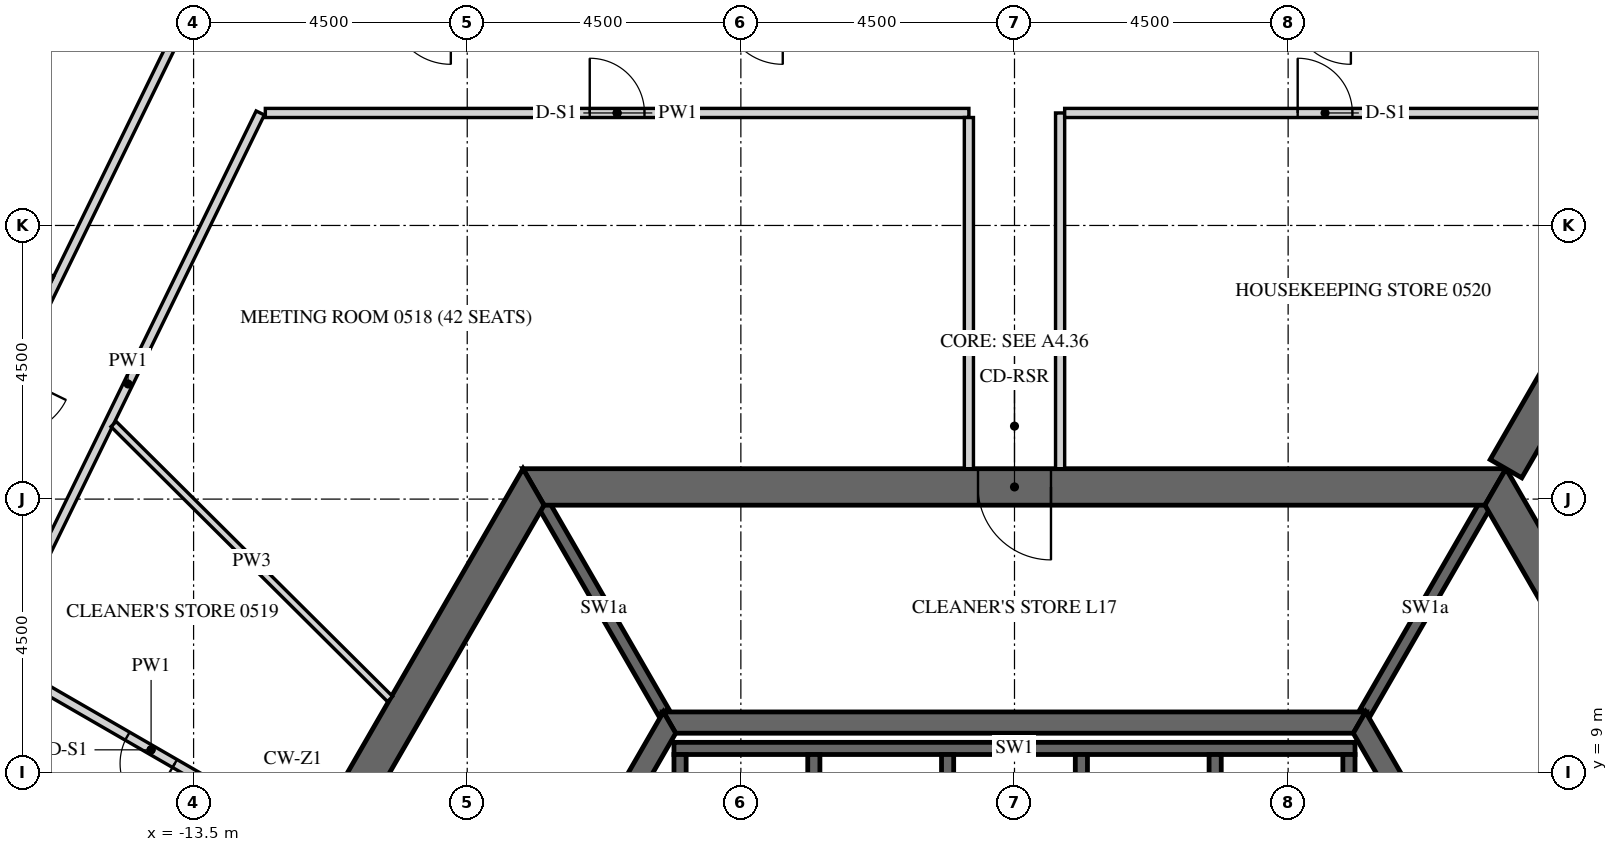
"""IFC4 building model, lengths in metres.
Left out: names, types, materials, properties, quantities, classifications, styles, units other than length and angle.
Written with IfcOpenShell. Run it as: python <this file> out.ifc"""

import sys

from ifc_helpers import new_model, si_unit, direction, frame, frame_2d, origin, place, context, subcontext, project, spatial, polyline, rectangle, outline, extrude, element, fill, save


model = new_model("IFC4")
c1 = context("Model", 3, precision=1e-05, world=origin(), true_north=direction((0.0, 1.0)))
c2 = subcontext(c1, "Body", "Model", "MODEL_VIEW")
j1 = project(units=[si_unit("LENGTHUNIT", "METRE"), si_unit("PLANEANGLEUNIT", "RADIAN")], contexts=[c1])
p1 = place(None, origin())
s1 = spatial("IfcSite", under=j1, at=p1, CompositionType="ELEMENT")
p2 = place(p1, origin())
s2 = spatial("IfcBuilding", under=s1, at=p2, CompositionType="ELEMENT")
p3 = place(p2, frame((0.0, 0.0, 80.4)))
s3 = spatial("IfcBuildingStorey", under=s2, at=p3, CompositionType="ELEMENT", Elevation=80.4)
p4 = place(p3, frame((-7.91, 13.7, -0.15), z_axis=(0.0, 0.0, 1.0), x_axis=(-0.499999880136, -0.866025472988, 0.0)))
e1 = element("IfcWall", 1, at=p4, inside=s3, PredefinedType="SHEAR", context=c2, shape_type="SweptSolid", body=[
    extrude(outline(polyline([(-0.173, -0.3), (15.993, -0.3), (15.646, 0.3), (0.173, 0.3), (-0.173, -0.3)])), origin(), (0.0, 0.0, 1.0), 3.9),
])
p5 = place(p4, frame((7.039, 0.0, 0.15)))
e2 = element("IfcOpeningElement", 2, at=p5, cuts=e1, PredefinedType="OPENING", context=c2, shape_type="SweptSolid", body=[
    extrude(rectangle(XDim=1.8, YDim=2.4, at=frame_2d((0.9, 1.2))), frame((0.0, 0.31, 0.0), z_axis=(0.0, -1.0, 0.0), x_axis=(1.0, 0.0, 0.0)), (0.0, 0.0, 1.0), 0.62),
])
p6 = place(p3, frame((15.819, 0.0, -0.15), z_axis=(0.0, 0.0, 1.0), x_axis=(-0.499999880136, 0.866025472988, 0.0)))
e3 = element("IfcWall", 3, at=p6, inside=s3, PredefinedType="SHEAR", context=c2, shape_type="SweptSolid", body=[
    extrude(outline(polyline([(-0.173, -0.3), (15.993, -0.3), (15.646, 0.3), (0.173, 0.3), (-0.173, -0.3)])), origin(), (0.0, 0.0, 1.0), 3.9),
])
p7 = place(p6, frame((6.981, 0.0, 0.15)))
e4 = element("IfcOpeningElement", 4, at=p7, cuts=e3, PredefinedType="OPENING", context=c2, shape_type="SweptSolid", body=[
    extrude(rectangle(XDim=1.8, YDim=2.4, at=frame_2d((0.9, 1.2))), frame((0.0, 0.31, 0.0), z_axis=(0.0, -1.0, 0.0), x_axis=(1.0, 0.0, 0.0)), (0.0, 0.0, 1.0), 0.62),
])
p8 = place(p3, frame((7.91, 13.7, -0.15), z_axis=(0.0, 0.0, 1.0), x_axis=(-1.0, 0.0, 0.0)))
e5 = element("IfcWall", 5, at=p8, inside=s3, PredefinedType="SHEAR", context=c2, shape_type="SweptSolid", body=[
    extrude(outline(polyline([(-0.173, -0.3), (15.993, -0.3), (15.646, 0.3), (0.173, 0.3), (-0.173, -0.3)])), origin(), (0.0, 0.0, 1.0), 3.9),
])
p9 = place(p8, frame((7.31, 0.0, 0.15)))
e6 = element("IfcOpeningElement", 6, at=p9, cuts=e5, PredefinedType="OPENING", context=c2, shape_type="SweptSolid", body=[
    extrude(rectangle(XDim=1.2, YDim=2.4, at=frame_2d((0.6, 1.2))), frame((0.0, 0.31, 0.0), z_axis=(0.0, -1.0, 0.0), x_axis=(1.0, 0.0, 0.0)), (0.0, 0.0, 1.0), 0.62),
])
p10 = place(p3, frame((8.083, 14.0, -0.15), z_axis=(0.0, 0.0, 1.0), x_axis=(0.499997680643, 0.866026742862, 0.0)))
e7 = element("IfcWall", 7, at=p10, inside=s3, PredefinedType="SHEAR", context=c2, shape_type="SweptSolid", body=[
    extrude(rectangle(XDim=16.509, YDim=0.6, at=frame_2d((8.254, 0.0))), origin(), (0.0, 0.0, 1.0), 3.9),
])
p11 = place(p10, frame((7.354, 0.0, 0.15)))
e8 = element("IfcOpeningElement", 8, at=p11, cuts=e7, PredefinedType="OPENING", context=c2, shape_type="SweptSolid", body=[
    extrude(rectangle(XDim=1.8, YDim=2.4, at=frame_2d((0.9, 1.2))), frame((0.0, 0.31, 0.0), z_axis=(0.0, -1.0, 0.0), x_axis=(1.0, 0.0, 0.0)), (0.0, 0.0, 1.0), 0.62),
])
p12 = place(p3, frame((-5.673, 9.825, -0.15), z_axis=(0.0, 0.0, 1.0), x_axis=(-0.499995046907, -0.866028263435, 0.0)))
e9 = element("IfcWall", 9, at=p12, inside=s3, PredefinedType="SHEAR", context=c2, shape_type="SweptSolid", body=[
    extrude(outline(polyline([(-0.101, -0.175), (11.446, -0.175), (11.244, 0.175), (0.101, 0.175), (-0.101, -0.175)])), origin(), (0.0, 0.0, 1.0), 3.9),
])
p13 = place(p12, frame((4.801, 0.0, 0.15)))
e10 = element("IfcOpeningElement", 10, at=p13, cuts=e9, PredefinedType="OPENING", context=c2, shape_type="SweptSolid", body=[
    extrude(rectangle(XDim=1.8, YDim=2.4, at=frame_2d((0.9, 1.2))), frame((0.0, 0.185, 0.0), z_axis=(0.0, -1.0, 0.0), x_axis=(1.0, 0.0, 0.0)), (0.0, 0.0, 1.0), 0.37),
])
p14 = place(p3, frame((11.345, 0.0, -0.15), z_axis=(0.0, 0.0, 1.0), x_axis=(-0.499995046907, 0.866028263435, 0.0)))
e11 = element("IfcWall", 11, at=p14, inside=s3, PredefinedType="SHEAR", context=c2, shape_type="SweptSolid", body=[
    extrude(outline(polyline([(-0.101, -0.175), (11.446, -0.175), (11.244, 0.175), (0.101, 0.175), (-0.101, -0.175)])), origin(), (0.0, 0.0, 1.0), 3.9),
])
p15 = place(p14, frame((4.744, 0.0, 0.15)))
e12 = element("IfcOpeningElement", 12, at=p15, cuts=e11, PredefinedType="OPENING", context=c2, shape_type="SweptSolid", body=[
    extrude(rectangle(XDim=1.8, YDim=2.4, at=frame_2d((0.9, 1.2))), frame((0.0, 0.185, 0.0), z_axis=(0.0, -1.0, 0.0), x_axis=(1.0, 0.0, 0.0)), (0.0, 0.0, 1.0), 0.37),
])
p16 = place(p3, frame((5.673, 9.825, -0.15), z_axis=(0.0, 0.0, 1.0), x_axis=(-1.0, 0.0, 0.0)))
e13 = element("IfcWall", 13, at=p16, inside=s3, PredefinedType="SHEAR", context=c2, shape_type="SweptSolid", body=[
    extrude(outline(polyline([(-0.101, -0.175), (11.446, -0.175), (11.244, 0.175), (0.101, 0.175), (-0.101, -0.175)])), origin(), (0.0, 0.0, 1.0), 3.9),
])
p17 = place(p3, frame((-5.6, 9.4, -0.25), z_axis=(0.0, 0.0, 1.0), x_axis=(1.0, 0.0, 0.0)))
e14 = element("IfcWall", 14, at=p17, inside=s3, PredefinedType="SHEAR", context=c2, shape_type="SweptSolid", body=[
    extrude(rectangle(XDim=11.2, YDim=0.2, at=frame_2d((5.6, 0.0))), origin(), (0.0, 0.0, 1.0), 3.9),
])
for number, where, z_axis, x_axis in (
    (15, (-5.5, 6.4, -0.25), (0.0, 0.0, 1.0), (0.0, 1.0, 0.0)),
    (16, (-3.3, 6.4, -0.25), (0.0, 0.0, 1.0), (0.0, 1.0, 0.0)),
    (17, (-1.1, 6.4, -0.25), (0.0, 0.0, 1.0), (0.0, 1.0, 0.0)),
    (18, (1.1, 6.4, -0.25), (0.0, 0.0, 1.0), (0.0, 1.0, 0.0)),
    (19, (3.3, 6.4, -0.25), (0.0, 0.0, 1.0), (0.0, 1.0, 0.0)),
    (20, (5.5, 6.4, -0.25), (0.0, 0.0, 1.0), (0.0, 1.0, 0.0)),
):
    element("IfcWall", number, at=place(p3, frame(where, z_axis=z_axis, x_axis=x_axis)), inside=s3, PredefinedType="SHEAR", context=c2, shape_type="SweptSolid", body=[
        extrude(rectangle(XDim=2.9, YDim=0.2, at=frame_2d((1.45, 0.0))), origin(), (0.0, 0.0, 1.0), 3.9),
    ])
for number, where, z_axis, x_axis in (
    (21, (5.773, 10.0, -0.15), (0.0, 0.0, 1.0), (0.5, 0.866, 0.0)),
    (22, (-5.773, 10.0, -0.15), (0.0, 0.0, 1.0), (-0.5, 0.866, 0.0)),
):
    element("IfcWall", number, at=place(p3, frame(where, z_axis=z_axis, x_axis=x_axis)), inside=s3, PredefinedType="SHEAR", context=c2, shape_type="SweptSolid", body=[
        extrude(rectangle(XDim=3.926, YDim=0.2, at=frame_2d((1.963, 0.0))), origin(), (0.0, 0.0, 1.0), 3.9),
    ])
p18 = place(p3, frame((-13.565, 21.575, 0.0), z_axis=(0.0, 0.0, 1.0), x_axis=(-0.438380787243, -0.898789344272, 0.0)))
e23 = element("IfcWall", 23, at=p18, inside=s3, PredefinedType="PARTITIONING", context=c2, shape_type="SweptSolid", body=[
    extrude(rectangle(XDim=21.668, YDim=0.15, at=frame_2d((10.834, 0.0))), origin(), (0.0, 0.0, 1.0), 2.988),
])
p19 = place(p18, frame((6.684, 0.0, 0.0)))
e24 = element("IfcOpeningElement", 24, at=p19, cuts=e23, PredefinedType="OPENING", context=c2, shape_type="SweptSolid", body=[
    extrude(rectangle(XDim=1.0, YDim=2.1, at=frame_2d((0.5, 1.05))), frame((0.0, 0.085, 0.0), z_axis=(0.0, -1.0, 0.0), x_axis=(1.0, 0.0, 0.0)), (0.0, 0.0, 1.0), 0.17),
])
p20 = place(p18, frame((17.651, 0.0, 0.0)))
e25 = element("IfcOpeningElement", 25, at=p20, cuts=e23, PredefinedType="OPENING", context=c2, shape_type="SweptSolid", body=[
    extrude(rectangle(XDim=1.0, YDim=2.1, at=frame_2d((0.5, 1.05))), frame((0.0, 0.085, 0.0), z_axis=(0.0, -1.0, 0.0), x_axis=(1.0, 0.0, 0.0)), (0.0, 0.0, 1.0), 0.17),
])
p21 = place(p3, frame((-16.751, 10.937, 0.0), z_axis=(0.0, 0.0, 1.0), x_axis=(0.438378523504, 0.898790448397, 0.0)))
e26 = element("IfcWall", 26, at=p21, inside=s3, PredefinedType="PARTITIONING", context=c2, shape_type="SweptSolid", body=[
    extrude(rectangle(XDim=9.917, YDim=0.15, at=frame_2d((4.958, 0.0))), origin(), (0.0, 0.0, 1.0), 2.988),
])
p22 = place(p3, frame((-12.32, 19.85, 0.0), z_axis=(0.0, 0.0, 1.0), x_axis=(1.0, 0.0, 0.0)))
e27 = element("IfcWall", 27, at=p22, inside=s3, PredefinedType="PARTITIONING", context=c2, shape_type="SweptSolid", body=[
    extrude(rectangle(XDim=11.57, YDim=0.15, at=frame_2d((5.785, 0.0))), origin(), (0.0, 0.0, 1.0), 2.988),
])
p23 = place(p22, frame((5.335, 0.0, 0.0)))
e28 = element("IfcOpeningElement", 28, at=p23, cuts=e27, PredefinedType="OPENING", context=c2, shape_type="SweptSolid", body=[
    extrude(rectangle(XDim=0.9, YDim=2.1, at=frame_2d((0.45, 1.05))), frame((0.0, 0.085, 0.0), z_axis=(0.0, -1.0, 0.0), x_axis=(1.0, 0.0, 0.0)), (0.0, 0.0, 1.0), 0.17),
])
p24 = place(p3, frame((-0.75, 19.775, 0.0), z_axis=(0.0, 0.0, 1.0), x_axis=(0.0, -1.0, 0.0)))
e29 = element("IfcWall", 29, at=p24, inside=s3, PredefinedType="PARTITIONING", context=c2, shape_type="SweptSolid", body=[
    extrude(rectangle(XDim=5.775, YDim=0.15, at=frame_2d((2.887, 0.0))), origin(), (0.0, 0.0, 1.0), 2.988),
])
p25 = place(p3, frame((-11.614, 7.884, 0.0), z_axis=(0.0, 0.0, 1.0), x_axis=(-0.86603508376, 0.499983233416, 0.0)))
e30 = element("IfcWall", 30, at=p25, inside=s3, PredefinedType="PARTITIONING", context=c2, shape_type="SweptSolid", body=[
    extrude(rectangle(XDim=5.97, YDim=0.15, at=frame_2d((2.985, 0.0))), origin(), (0.0, 0.0, 1.0), 2.988),
])
p26 = place(p25, frame((2.535, 0.0, 0.0)))
e31 = element("IfcOpeningElement", 31, at=p26, cuts=e30, PredefinedType="OPENING", context=c2, shape_type="SweptSolid", body=[
    extrude(rectangle(XDim=0.9, YDim=2.1, at=frame_2d((0.45, 1.05))), frame((0.0, 0.085, 0.0), z_axis=(0.0, -1.0, 0.0), x_axis=(1.0, 0.0, 0.0)), (0.0, 0.0, 1.0), 0.17),
])
p27 = place(p3, frame((0.75, 14.0, 0.0), z_axis=(0.0, 0.0, 1.0), x_axis=(0.0, 1.0, 0.0)))
e32 = element("IfcWall", 32, at=p27, inside=s3, PredefinedType="PARTITIONING", context=c2, shape_type="SweptSolid", body=[
    extrude(rectangle(XDim=5.85, YDim=0.15, at=frame_2d((2.925, 0.0))), origin(), (0.0, 0.0, 1.0), 2.988),
])
p28 = place(p3, frame((0.825, 19.85, 0.0), z_axis=(0.0, 0.0, 1.0), x_axis=(1.0, 0.0, 0.0)))
e33 = element("IfcWall", 33, at=p28, inside=s3, PredefinedType="PARTITIONING", context=c2, shape_type="SweptSolid", body=[
    extrude(rectangle(XDim=8.564, YDim=0.15, at=frame_2d((4.282, 0.0))), origin(), (0.0, 0.0, 1.0), 2.988),
])
p29 = place(p28, frame((3.832, 0.0, 0.0)))
e34 = element("IfcOpeningElement", 34, at=p29, cuts=e33, PredefinedType="OPENING", context=c2, shape_type="SweptSolid", body=[
    extrude(rectangle(XDim=0.9, YDim=2.1, at=frame_2d((0.45, 1.05))), frame((0.0, 0.085, 0.0), z_axis=(0.0, -1.0, 0.0), x_axis=(1.0, 0.0, 0.0)), (0.0, 0.0, 1.0), 0.17),
])
p30 = place(p3, frame((-17.642, 8.94, 0.0), z_axis=(0.0, 0.0, 1.0), x_axis=(0.866017948234, -0.500012913169, 0.0)))
e35 = element("IfcWall", 35, at=p30, inside=s3, PredefinedType="PARTITIONING", context=c2, shape_type="SweptSolid", body=[
    extrude(rectangle(XDim=5.748, YDim=0.15, at=frame_2d((2.874, 0.0))), origin(), (0.0, 0.0, 1.0), 2.988),
])
p31 = place(p3, frame((-22.782, 20.47, 0.0), z_axis=(0.0, 0.0, 1.0), x_axis=(0.898789402655, -0.438380667542, 0.0)))
e36 = element("IfcWall", 36, at=p31, inside=s3, PredefinedType="PARTITIONING", context=c2, shape_type="SweptSolid", body=[
    extrude(rectangle(XDim=7.725, YDim=0.18, at=frame_2d((3.862, 0.0))), origin(), (0.0, 0.0, 1.0), 2.988),
])
p32 = place(p3, frame((-14.815, 14.734, 0.0), z_axis=(0.0, 0.0, 1.0), x_axis=(0.709046184876, -0.705162043584, 0.0)))
e37 = element("IfcWall", 37, at=p32, inside=s3, PredefinedType="PARTITIONING", context=c2, shape_type="SweptSolid", body=[
    extrude(rectangle(XDim=6.411, YDim=0.12, at=frame_2d((3.206, 0.0))), origin(), (0.0, 0.0, 1.0), 2.988),
])
p33 = place(p9, origin())
e38 = element("IfcDoor", 38, at=p33, inside=s3, OperationType="SINGLE_SWING_LEFT", PredefinedType="DOOR", context=c2, shape_type="SweptSolid", body=[
    extrude(rectangle(XDim=1.2, YDim=2.4, at=frame_2d((0.6, 1.2))), frame((0.0, 0.025, 0.0), z_axis=(0.0, -1.0, 0.0), x_axis=(1.0, 0.0, 0.0)), (0.0, 0.0, 1.0), 0.05),
])
fill(e6, e38)
p34 = place(p23, origin())
e39 = element("IfcDoor", 39, at=p34, inside=s3, OperationType="SINGLE_SWING_RIGHT", PredefinedType="DOOR", context=c2, shape_type="SweptSolid", body=[
    extrude(rectangle(XDim=0.9, YDim=2.1, at=frame_2d((0.45, 1.05))), frame((0.0, 0.025, 0.0), z_axis=(0.0, -1.0, 0.0), x_axis=(1.0, 0.0, 0.0)), (0.0, 0.0, 1.0), 0.05),
])
fill(e28, e39)
p35 = place(p26, origin())
e40 = element("IfcDoor", 40, at=p35, inside=s3, OperationType="SINGLE_SWING_RIGHT", PredefinedType="DOOR", context=c2, shape_type="SweptSolid", body=[
    extrude(rectangle(XDim=0.9, YDim=2.1, at=frame_2d((0.45, 1.05))), frame((0.0, 0.025, 0.0), z_axis=(0.0, -1.0, 0.0), x_axis=(1.0, 0.0, 0.0)), (0.0, 0.0, 1.0), 0.05),
])
fill(e31, e40)
p36 = place(p29, origin())
e41 = element("IfcDoor", 41, at=p36, inside=s3, OperationType="SINGLE_SWING_RIGHT", PredefinedType="DOOR", context=c2, shape_type="SweptSolid", body=[
    extrude(rectangle(XDim=0.9, YDim=2.1, at=frame_2d((0.45, 1.05))), frame((0.0, 0.025, 0.0), z_axis=(0.0, -1.0, 0.0), x_axis=(1.0, 0.0, 0.0)), (0.0, 0.0, 1.0), 0.05),
])
fill(e34, e41)
save(model, sys.argv[1])
